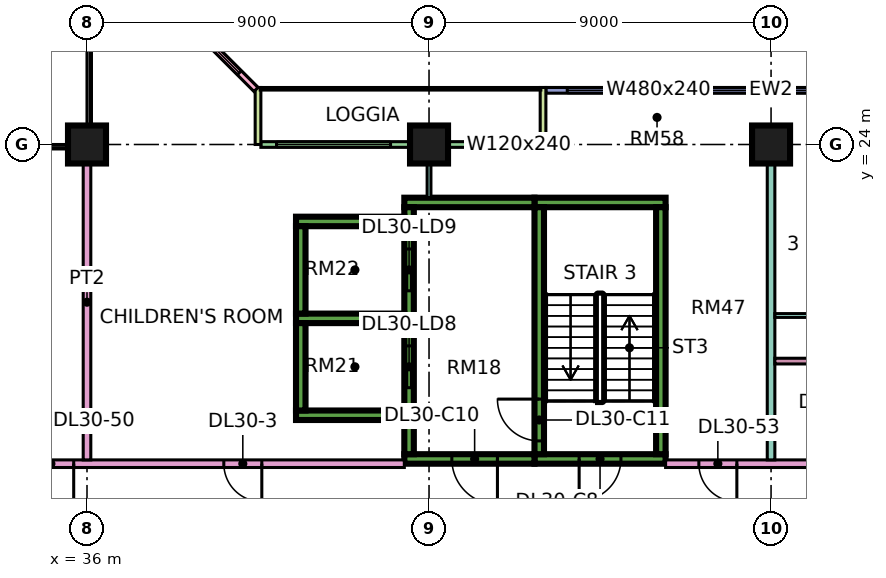
"""IFC4 building model, lengths in metres.
Left out: names, types, materials, properties, quantities, classifications, styles, units other than length and angle.
Written with IfcOpenShell. Run it as: python <this file> out.ifc"""

import sys

from ifc_helpers import new_model, si_unit, direction, frame, frame_2d, origin, origin_2d, place, context, subcontext, project, spatial, rectangle, extrude, element, fill, save


model = new_model("IFC4")
c1 = context("Model", 3, precision=1e-05, world=origin(), true_north=direction((0.0, 1.0)))
c2 = subcontext(c1, "Body", "Model", "MODEL_VIEW")
j1 = project(units=[si_unit("LENGTHUNIT", "METRE"), si_unit("PLANEANGLEUNIT", "RADIAN")], contexts=[c1])
p1 = place(None, origin())
s1 = spatial("IfcSite", under=j1, at=p1, CompositionType="ELEMENT")
p2 = place(p1, origin())
s2 = spatial("IfcBuilding", under=s1, at=p2, CompositionType="ELEMENT")
p3 = place(p2, frame((0.0, 0.0, 129.4)))
s3 = spatial("IfcBuildingStorey", under=s2, at=p3, CompositionType="ELEMENT", Elevation=129.4)
for number, where, z_axis, x_axis in (
    (1, (36.0, 24.0, 0.0), (0.0, 0.0, 1.0), (1.0, 0.0, 0.0)),
    (2, (45.0, 24.0, 0.0), (0.0, 0.0, 1.0), (1.0, 0.0, 0.0)),
    (3, (54.0, 24.0, 0.0), (0.0, 0.0, 1.0), (1.0, 0.0, 0.0)),
):
    element("IfcColumn", number, at=place(p3, frame(where, z_axis=z_axis, x_axis=x_axis)), inside=s3, PredefinedType="COLUMN", context=c2, shape_type="SweptSolid", body=[
        extrude(rectangle(XDim=1.0, YDim=1.0, at=origin_2d()), origin(), (0.0, 0.0, 1.0), 3.75),
    ])
p4 = place(p3, frame((47.775, 15.725, 0.0), z_axis=(0.0, 0.0, 1.0), x_axis=(1.0, 0.0, 0.0)))
e4 = element("IfcWall", 4, at=p4, inside=s3, PredefinedType="SHEAR", context=c2, shape_type="SweptSolid", body=[
    extrude(rectangle(XDim=3.45, YDim=0.25, at=frame_2d((1.725, 0.0))), origin(), (0.0, 0.0, 1.0), 3.75),
])
p5 = place(p4, frame((1.175, 0.0, 0.0)))
e5 = element("IfcOpeningElement", 5, at=p5, cuts=e4, PredefinedType="OPENING", context=c2, shape_type="SweptSolid", body=[
    extrude(rectangle(XDim=1.1, YDim=2.2, at=frame_2d((0.55, 1.1))), frame((0.0, 0.135, 0.0), z_axis=(0.0, -1.0, 0.0), x_axis=(1.0, 0.0, 0.0)), (0.0, 0.0, 1.0), 0.27),
])
p6 = place(p3, frame((47.775, 22.475, 0.0), z_axis=(0.0, 0.0, 1.0), x_axis=(1.0, 0.0, 0.0)))
e6 = element("IfcWall", 6, at=p6, inside=s3, PredefinedType="SHEAR", context=c2, shape_type="SweptSolid", body=[
    extrude(rectangle(XDim=3.45, YDim=0.25, at=frame_2d((1.725, 0.0))), origin(), (0.0, 0.0, 1.0), 3.75),
])
p7 = place(p3, frame((47.9, 15.85, 0.0), z_axis=(0.0, 0.0, 1.0), x_axis=(0.0, 1.0, 0.0)))
e7 = element("IfcWall", 7, at=p7, inside=s3, PredefinedType="SHEAR", context=c2, shape_type="SweptSolid", body=[
    extrude(rectangle(XDim=6.5, YDim=0.25, at=frame_2d((3.25, 0.0))), origin(), (0.0, 0.0, 1.0), 3.75),
])
p8 = place(p7, frame((0.35, 0.0, 0.0)))
e8 = element("IfcOpeningElement", 8, at=p8, cuts=e7, PredefinedType="OPENING", context=c2, shape_type="SweptSolid", body=[
    extrude(rectangle(XDim=1.1, YDim=2.2, at=frame_2d((0.55, 1.1))), frame((0.0, 0.135, 0.0), z_axis=(0.0, -1.0, 0.0), x_axis=(1.0, 0.0, 0.0)), (0.0, 0.0, 1.0), 0.27),
])
p9 = place(p3, frame((51.1, 15.85, 0.0), z_axis=(0.0, 0.0, 1.0), x_axis=(0.0, 1.0, 0.0)))
e9 = element("IfcWall", 9, at=p9, inside=s3, PredefinedType="SHEAR", context=c2, shape_type="SweptSolid", body=[
    extrude(rectangle(XDim=6.5, YDim=0.25, at=frame_2d((3.25, 0.0))), origin(), (0.0, 0.0, 1.0), 3.75),
])
p10 = place(p3, frame((44.35, 15.725, 0.0), z_axis=(0.0, 0.0, 1.0), x_axis=(1.0, 0.0, 0.0)))
e10 = element("IfcWall", 10, at=p10, inside=s3, PredefinedType="SHEAR", context=c2, shape_type="SweptSolid", body=[
    extrude(rectangle(XDim=3.425, YDim=0.25, at=frame_2d((1.712, 0.0))), origin(), (0.0, 0.0, 1.0), 3.75),
])
p11 = place(p10, frame((1.25, 0.0, 0.0)))
e11 = element("IfcOpeningElement", 11, at=p11, cuts=e10, PredefinedType="OPENING", context=c2, shape_type="SweptSolid", body=[
    extrude(rectangle(XDim=1.2, YDim=2.2, at=frame_2d((0.6, 1.1))), frame((0.0, 0.135, 0.0), z_axis=(0.0, -1.0, 0.0), x_axis=(1.0, 0.0, 0.0)), (0.0, 0.0, 1.0), 0.27),
])
p12 = place(p3, frame((44.35, 22.475, 0.0), z_axis=(0.0, 0.0, 1.0), x_axis=(1.0, 0.0, 0.0)))
e12 = element("IfcWall", 12, at=p12, inside=s3, PredefinedType="SHEAR", context=c2, shape_type="SweptSolid", body=[
    extrude(rectangle(XDim=3.425, YDim=0.25, at=frame_2d((1.712, 0.0))), origin(), (0.0, 0.0, 1.0), 3.75),
])
p13 = place(p3, frame((44.475, 15.85, 0.0), z_axis=(0.0, 0.0, 1.0), x_axis=(0.0, 1.0, 0.0)))
e13 = element("IfcWall", 13, at=p13, inside=s3, PredefinedType="SHEAR", context=c2, shape_type="SweptSolid", body=[
    extrude(rectangle(XDim=6.5, YDim=0.25, at=frame_2d((3.25, 0.0))), origin(), (0.0, 0.0, 1.0), 3.75),
])
p14 = place(p13, frame((1.75, 0.0, 0.0)))
e14 = element("IfcOpeningElement", 14, at=p14, cuts=e13, PredefinedType="OPENING", context=c2, shape_type="SweptSolid", body=[
    extrude(rectangle(XDim=1.1, YDim=2.2, at=frame_2d((0.55, 1.1))), frame((0.0, 0.135, 0.0), z_axis=(0.0, -1.0, 0.0), x_axis=(1.0, 0.0, 0.0)), (0.0, 0.0, 1.0), 0.27),
])
p15 = place(p13, frame((4.3, 0.0, 0.0)))
e15 = element("IfcOpeningElement", 15, at=p15, cuts=e13, PredefinedType="OPENING", context=c2, shape_type="SweptSolid", body=[
    extrude(rectangle(XDim=1.1, YDim=2.2, at=frame_2d((0.55, 1.1))), frame((0.0, 0.135, 0.0), z_axis=(0.0, -1.0, 0.0), x_axis=(1.0, 0.0, 0.0)), (0.0, 0.0, 1.0), 0.27),
])
for number, where, z_axis, x_axis in (
    (16, (41.5, 16.875, 0.0), (0.0, 0.0, 1.0), (1.0, 0.0, 0.0)),
    (17, (41.5, 19.425, 0.0), (0.0, 0.0, 1.0), (1.0, 0.0, 0.0)),
    (18, (41.5, 21.975, 0.0), (0.0, 0.0, 1.0), (1.0, 0.0, 0.0)),
):
    element("IfcWall", number, at=place(p3, frame(where, z_axis=z_axis, x_axis=x_axis)), inside=s3, PredefinedType="SHEAR", context=c2, shape_type="SweptSolid", body=[
        extrude(rectangle(XDim=2.85, YDim=0.25, at=frame_2d((1.425, 0.0))), origin(), (0.0, 0.0, 1.0), 3.75),
    ])
for number, where, z_axis, x_axis in (
    (19, (41.625, 17.0, 0.0), (0.0, 0.0, 1.0), (0.0, 1.0, 0.0)),
    (20, (41.625, 19.55, 0.0), (0.0, 0.0, 1.0), (0.0, 1.0, 0.0)),
):
    element("IfcWall", number, at=place(p3, frame(where, z_axis=z_axis, x_axis=x_axis)), inside=s3, PredefinedType="SHEAR", context=c2, shape_type="SweptSolid", body=[
        extrude(rectangle(XDim=2.3, YDim=0.25, at=frame_2d((1.15, 0.0))), origin(), (0.0, 0.0, 1.0), 3.75),
    ])
p16 = place(p3, frame((59.925, 25.425, 0.0), z_axis=(0.0, 0.0, 1.0), x_axis=(-1.0, 0.0, 0.0)))
e21 = element("IfcWall", 21, at=p16, inside=s3, PredefinedType="SOLIDWALL", context=c2, shape_type="SweptSolid", body=[
    extrude(rectangle(XDim=11.85, YDim=0.15, at=frame_2d((5.925, 0.0))), origin(), (0.0, 0.0, 1.0), 3.35),
])
p17 = place(p16, frame((0.562, 0.0, 0.45)))
e22 = element("IfcOpeningElement", 22, at=p17, cuts=e21, PredefinedType="OPENING", context=c2, shape_type="SweptSolid", body=[
    extrude(rectangle(XDim=1.8, YDim=2.4, at=frame_2d((0.9, 1.2))), frame((0.0, 0.085, 0.0), z_axis=(0.0, -1.0, 0.0), x_axis=(1.0, 0.0, 0.0)), (0.0, 0.0, 1.0), 0.17),
])
p18 = place(p16, frame((3.525, 0.0, 0.45)))
e23 = element("IfcOpeningElement", 23, at=p18, cuts=e21, PredefinedType="OPENING", context=c2, shape_type="SweptSolid", body=[
    extrude(rectangle(XDim=1.8, YDim=2.4, at=frame_2d((0.9, 1.2))), frame((0.0, 0.085, 0.0), z_axis=(0.0, -1.0, 0.0), x_axis=(1.0, 0.0, 0.0)), (0.0, 0.0, 1.0), 0.17),
])
p19 = place(p16, frame((6.488, 0.0, 0.45)))
e24 = element("IfcOpeningElement", 24, at=p19, cuts=e21, PredefinedType="OPENING", context=c2, shape_type="SweptSolid", body=[
    extrude(rectangle(XDim=4.8, YDim=2.4, at=frame_2d((2.4, 1.2))), frame((0.0, 0.085, 0.0), z_axis=(0.0, -1.0, 0.0), x_axis=(1.0, 0.0, 0.0)), (0.0, 0.0, 1.0), 0.17),
])
p20 = place(p3, frame((47.925, 24.0, 0.0), z_axis=(0.0, 0.0, 1.0), x_axis=(-1.0, 0.0, 0.0)))
e25 = element("IfcWall", 25, at=p20, inside=s3, PredefinedType="SOLIDWALL", context=c2, shape_type="SweptSolid", body=[
    extrude(rectangle(XDim=7.35, YDim=0.15, at=frame_2d((3.675, 0.0))), origin(), (0.0, 0.0, 1.0), 3.35),
])
p21 = place(p20, frame((0.562, 0.0, 0.45)))
e26 = element("IfcOpeningElement", 26, at=p21, cuts=e25, PredefinedType="OPENING", context=c2, shape_type="SweptSolid", body=[
    extrude(rectangle(XDim=1.2, YDim=2.4, at=frame_2d((0.6, 1.2))), frame((0.0, 0.085, 0.0), z_axis=(0.0, -1.0, 0.0), x_axis=(1.0, 0.0, 0.0)), (0.0, 0.0, 1.0), 0.17),
])
p22 = place(p20, frame((3.938, 0.0, 0.45)))
e27 = element("IfcOpeningElement", 27, at=p22, cuts=e25, PredefinedType="OPENING", context=c2, shape_type="SweptSolid", body=[
    extrude(rectangle(XDim=3.0, YDim=2.4, at=frame_2d((1.5, 1.2))), frame((0.0, 0.085, 0.0), z_axis=(0.0, -1.0, 0.0), x_axis=(1.0, 0.0, 0.0)), (0.0, 0.0, 1.0), 0.17),
])
for number, where, z_axis, x_axis in (
    (28, (48.0, 25.5, 0.0), (0.0, 0.0, 1.0), (0.0, -1.0, 0.0)),
    (29, (40.5, 25.5, 0.0), (0.0, 0.0, 1.0), (0.0, -1.0, 0.0)),
):
    element("IfcWall", number, at=place(p3, frame(where, z_axis=z_axis, x_axis=x_axis)), inside=s3, PredefinedType="SOLIDWALL", context=c2, shape_type="SweptSolid", body=[
        extrude(rectangle(XDim=1.5, YDim=0.15, at=frame_2d((0.75, 0.0))), origin(), (0.0, 0.0, 1.0), 3.35),
    ])
p23 = place(p3, frame((40.447, 25.447, 0.0), z_axis=(0.0, 0.0, 1.0), x_axis=(-0.707106781187, 0.707106781187, 0.0)))
e30 = element("IfcWall", 30, at=p23, inside=s3, PredefinedType="SOLIDWALL", context=c2, shape_type="SweptSolid", body=[
    extrude(rectangle(XDim=4.243, YDim=0.15, at=frame_2d((2.121, 0.0))), origin(), (0.0, 0.0, 1.0), 3.35),
])
p24 = place(p23, frame((0.621, 0.0, 0.45)))
e31 = element("IfcOpeningElement", 31, at=p24, cuts=e30, PredefinedType="OPENING", context=c2, shape_type="SweptSolid", body=[
    extrude(rectangle(XDim=3.0, YDim=2.4, at=frame_2d((1.5, 1.2))), frame((0.0, 0.085, 0.0), z_axis=(0.0, -1.0, 0.0), x_axis=(1.0, 0.0, 0.0)), (0.0, 0.0, 1.0), 0.17),
])
p25 = place(p3, frame((34.0, 15.6, 0.0), z_axis=(0.0, 0.0, 1.0), x_axis=(1.0, 0.0, 0.0)))
e32 = element("IfcWall", 32, at=p25, inside=s3, PredefinedType="PARTITIONING", context=c2, shape_type="SweptSolid", body=[
    extrude(rectangle(XDim=10.35, YDim=0.2, at=frame_2d((5.175, 0.0))), origin(), (0.0, 0.0, 1.0), 3.35),
])
p26 = place(p25, frame((5.6, 0.0, 0.0)))
e33 = element("IfcOpeningElement", 33, at=p26, cuts=e32, PredefinedType="OPENING", context=c2, shape_type="SweptSolid", body=[
    extrude(rectangle(XDim=1.0, YDim=2.1, at=frame_2d((0.5, 1.05))), frame((0.0, 0.11, 0.0), z_axis=(0.0, -1.0, 0.0), x_axis=(1.0, 0.0, 0.0)), (0.0, 0.0, 1.0), 0.22),
])
p27 = place(p25, frame((0.45, 0.0, 0.0)))
e34 = element("IfcOpeningElement", 34, at=p27, cuts=e32, PredefinedType="OPENING", context=c2, shape_type="SweptSolid", body=[
    extrude(rectangle(XDim=1.2, YDim=2.1, at=frame_2d((0.6, 1.05))), frame((0.0, 0.11, 0.0), z_axis=(0.0, -1.0, 0.0), x_axis=(1.0, 0.0, 0.0)), (0.0, 0.0, 1.0), 0.22),
])
p28 = place(p3, frame((36.0, 15.7, 0.0), z_axis=(0.0, 0.0, 1.0), x_axis=(0.0, 1.0, 0.0)))
e35 = element("IfcWall", 35, at=p28, inside=s3, PredefinedType="PARTITIONING", context=c2, shape_type="SweptSolid", body=[
    extrude(rectangle(XDim=8.3, YDim=0.2, at=frame_2d((4.15, 0.0))), origin(), (0.0, 0.0, 1.0), 3.35),
])
p29 = place(p3, frame((45.0, 22.6, 0.0), z_axis=(0.0, 0.0, 1.0), x_axis=(0.0, 1.0, 0.0)))
e36 = element("IfcWall", 36, at=p29, inside=s3, PredefinedType="PARTITIONING", context=c2, shape_type="SweptSolid", body=[
    extrude(rectangle(XDim=1.326, YDim=0.1, at=frame_2d((0.663, 0.0))), origin(), (0.0, 0.0, 1.0), 3.35),
])
p30 = place(p3, frame((51.225, 15.6, 0.0), z_axis=(0.0, 0.0, 1.0), x_axis=(1.0, 0.0, 0.0)))
e37 = element("IfcWall", 37, at=p30, inside=s3, PredefinedType="PARTITIONING", context=c2, shape_type="SweptSolid", body=[
    extrude(rectangle(XDim=20.701, YDim=0.2, at=frame_2d((10.351, 0.0))), origin(), (0.0, 0.0, 1.0), 3.35),
])
p31 = place(p30, frame((15.875, 0.0, 0.0)))
e38 = element("IfcOpeningElement", 38, at=p31, cuts=e37, PredefinedType="OPENING", context=c2, shape_type="SweptSolid", body=[
    extrude(rectangle(XDim=1.0, YDim=2.1, at=frame_2d((0.5, 1.05))), frame((0.0, 0.11, 0.0), z_axis=(0.0, -1.0, 0.0), x_axis=(1.0, 0.0, 0.0)), (0.0, 0.0, 1.0), 0.22),
])
p32 = place(p30, frame((0.875, 0.0, 0.0)))
e39 = element("IfcOpeningElement", 39, at=p32, cuts=e37, PredefinedType="OPENING", context=c2, shape_type="SweptSolid", body=[
    extrude(rectangle(XDim=1.0, YDim=2.1, at=frame_2d((0.5, 1.05))), frame((0.0, 0.11, 0.0), z_axis=(0.0, -1.0, 0.0), x_axis=(1.0, 0.0, 0.0)), (0.0, 0.0, 1.0), 0.22),
])
p33 = place(p3, frame((54.0, 15.7, 0.0), z_axis=(0.0, 0.0, 1.0), x_axis=(0.0, 1.0, 0.0)))
e40 = element("IfcWall", 40, at=p33, inside=s3, PredefinedType="PARTITIONING", context=c2, shape_type="SweptSolid", body=[
    extrude(rectangle(XDim=8.3, YDim=0.2, at=frame_2d((4.15, 0.0))), origin(), (0.0, 0.0, 1.0), 3.35),
])
p34 = place(p3, frame((54.1, 18.3, 0.0), z_axis=(0.0, 0.0, 1.0), x_axis=(1.0, 0.0, 0.0)))
e41 = element("IfcWall", 41, at=p34, inside=s3, PredefinedType="PARTITIONING", context=c2, shape_type="SweptSolid", body=[
    extrude(rectangle(XDim=11.975, YDim=0.15, at=frame_2d((5.987, 0.0))), origin(), (0.0, 0.0, 1.0), 3.35),
])
p35 = place(p34, frame((5.45, 0.0, 0.0)))
e42 = element("IfcOpeningElement", 42, at=p35, cuts=e41, PredefinedType="OPENING", context=c2, shape_type="SweptSolid", body=[
    extrude(rectangle(XDim=0.9, YDim=2.1, at=frame_2d((0.45, 1.05))), frame((0.0, 0.085, 0.0), z_axis=(0.0, -1.0, 0.0), x_axis=(1.0, 0.0, 0.0)), (0.0, 0.0, 1.0), 0.17),
])
p36 = place(p34, frame((1.25, 0.0, 0.0)))
e43 = element("IfcOpeningElement", 43, at=p36, cuts=e41, PredefinedType="OPENING", context=c2, shape_type="SweptSolid", body=[
    extrude(rectangle(XDim=0.9, YDim=2.1, at=frame_2d((0.45, 1.05))), frame((0.0, 0.085, 0.0), z_axis=(0.0, -1.0, 0.0), x_axis=(1.0, 0.0, 0.0)), (0.0, 0.0, 1.0), 0.17),
])
p37 = place(p3, frame((54.1, 19.5, 0.0), z_axis=(0.0, 0.0, 1.0), x_axis=(1.0, 0.0, 0.0)))
e44 = element("IfcWall", 44, at=p37, inside=s3, PredefinedType="PARTITIONING", context=c2, shape_type="SweptSolid", body=[
    extrude(rectangle(XDim=2.85, YDim=0.1, at=frame_2d((1.425, 0.0))), origin(), (0.0, 0.0, 1.0), 3.35),
])
p38 = place(p37, frame((0.95, 0.0, 0.0)))
e45 = element("IfcOpeningElement", 45, at=p38, cuts=e44, PredefinedType="OPENING", context=c2, shape_type="SweptSolid", body=[
    extrude(rectangle(XDim=0.9, YDim=2.1, at=frame_2d((0.45, 1.05))), frame((0.0, 0.06, 0.0), z_axis=(0.0, -1.0, 0.0), x_axis=(1.0, 0.0, 0.0)), (0.0, 0.0, 1.0), 0.12),
])
p39 = place(p18, origin())
e46 = element("IfcWindow", 46, at=p39, inside=s3, PartitioningType="SINGLE_PANEL", PredefinedType="WINDOW", context=c2, shape_type="SweptSolid", body=[
    extrude(rectangle(XDim=1.8, YDim=2.4, at=frame_2d((0.9, 1.2))), frame((0.0, 0.03, 0.0), z_axis=(0.0, -1.0, 0.0), x_axis=(1.0, 0.0, 0.0)), (0.0, 0.0, 1.0), 0.06),
])
fill(e23, e46)
p40 = place(p19, origin())
e47 = element("IfcWindow", 47, at=p40, inside=s3, PartitioningType="SINGLE_PANEL", PredefinedType="WINDOW", context=c2, shape_type="SweptSolid", body=[
    extrude(rectangle(XDim=4.8, YDim=2.4, at=frame_2d((2.4, 1.2))), frame((0.0, 0.03, 0.0), z_axis=(0.0, -1.0, 0.0), x_axis=(1.0, 0.0, 0.0)), (0.0, 0.0, 1.0), 0.06),
])
fill(e24, e47)
p41 = place(p21, origin())
e48 = element("IfcWindow", 48, at=p41, inside=s3, PartitioningType="SINGLE_PANEL", PredefinedType="WINDOW", context=c2, shape_type="SweptSolid", body=[
    extrude(rectangle(XDim=1.2, YDim=2.4, at=frame_2d((0.6, 1.2))), frame((0.0, 0.03, 0.0), z_axis=(0.0, -1.0, 0.0), x_axis=(1.0, 0.0, 0.0)), (0.0, 0.0, 1.0), 0.06),
])
fill(e26, e48)
p42 = place(p22, origin())
e49 = element("IfcWindow", 49, at=p42, inside=s3, PartitioningType="SINGLE_PANEL", PredefinedType="WINDOW", context=c2, shape_type="SweptSolid", body=[
    extrude(rectangle(XDim=3.0, YDim=2.4, at=frame_2d((1.5, 1.2))), frame((0.0, 0.03, 0.0), z_axis=(0.0, -1.0, 0.0), x_axis=(1.0, 0.0, 0.0)), (0.0, 0.0, 1.0), 0.06),
])
fill(e27, e49)
p43 = place(p24, origin())
e50 = element("IfcWindow", 50, at=p43, inside=s3, PartitioningType="SINGLE_PANEL", PredefinedType="WINDOW", context=c2, shape_type="SweptSolid", body=[
    extrude(rectangle(XDim=3.0, YDim=2.4, at=frame_2d((1.5, 1.2))), frame((0.0, 0.03, 0.0), z_axis=(0.0, -1.0, 0.0), x_axis=(1.0, 0.0, 0.0)), (0.0, 0.0, 1.0), 0.06),
])
fill(e31, e50)
p44 = place(p5, frame((1.1, 0.0, 0.0), z_axis=(0.0, 0.0, 1.0), x_axis=(-1.0, 0.0, 0.0)))
e51 = element("IfcDoor", 51, at=p44, inside=s3, OperationType="SINGLE_SWING_LEFT", PredefinedType="DOOR", context=c2, shape_type="SweptSolid", body=[
    extrude(rectangle(XDim=1.1, YDim=2.2, at=frame_2d((0.55, 1.1))), frame((0.0, 0.025, 0.0), z_axis=(0.0, -1.0, 0.0), x_axis=(1.0, 0.0, 0.0)), (0.0, 0.0, 1.0), 0.05),
])
fill(e5, e51)
p45 = place(p11, origin())
e52 = element("IfcDoor", 52, at=p45, inside=s3, OperationType="SINGLE_SWING_RIGHT", PredefinedType="DOOR", context=c2, shape_type="SweptSolid", body=[
    extrude(rectangle(XDim=1.2, YDim=2.2, at=frame_2d((0.6, 1.1))), frame((0.0, 0.025, 0.0), z_axis=(0.0, -1.0, 0.0), x_axis=(1.0, 0.0, 0.0)), (0.0, 0.0, 1.0), 0.05),
])
fill(e11, e52)
p46 = place(p8, frame((1.1, 0.0, 0.0), z_axis=(0.0, 0.0, 1.0), x_axis=(-1.0, 0.0, 0.0)))
e53 = element("IfcDoor", 53, at=p46, inside=s3, OperationType="SINGLE_SWING_RIGHT", PredefinedType="DOOR", context=c2, shape_type="SweptSolid", body=[
    extrude(rectangle(XDim=1.1, YDim=2.2, at=frame_2d((0.55, 1.1))), frame((0.0, 0.025, 0.0), z_axis=(0.0, -1.0, 0.0), x_axis=(1.0, 0.0, 0.0)), (0.0, 0.0, 1.0), 0.05),
])
fill(e8, e53)
p47 = place(p14, origin())
e54 = element("IfcDoor", 54, at=p47, inside=s3, OperationType="DOUBLE_DOOR_SLIDING", PredefinedType="DOOR", context=c2, shape_type="SweptSolid", body=[
    extrude(rectangle(XDim=1.1, YDim=2.2, at=frame_2d((0.55, 1.1))), frame((0.0, 0.025, 0.0), z_axis=(0.0, -1.0, 0.0), x_axis=(1.0, 0.0, 0.0)), (0.0, 0.0, 1.0), 0.05),
])
fill(e14, e54)
p48 = place(p15, origin())
e55 = element("IfcDoor", 55, at=p48, inside=s3, OperationType="DOUBLE_DOOR_SLIDING", PredefinedType="DOOR", context=c2, shape_type="SweptSolid", body=[
    extrude(rectangle(XDim=1.1, YDim=2.2, at=frame_2d((0.55, 1.1))), frame((0.0, 0.025, 0.0), z_axis=(0.0, -1.0, 0.0), x_axis=(1.0, 0.0, 0.0)), (0.0, 0.0, 1.0), 0.05),
])
fill(e15, e55)
p49 = place(p26, origin())
e56 = element("IfcDoor", 56, at=p49, inside=s3, OperationType="SINGLE_SWING_RIGHT", PredefinedType="DOOR", context=c2, shape_type="SweptSolid", body=[
    extrude(rectangle(XDim=1.0, YDim=2.1, at=frame_2d((0.5, 1.05))), frame((0.0, 0.025, 0.0), z_axis=(0.0, -1.0, 0.0), x_axis=(1.0, 0.0, 0.0)), (0.0, 0.0, 1.0), 0.05),
])
fill(e33, e56)
p50 = place(p27, origin())
e57 = element("IfcDoor", 57, at=p50, inside=s3, OperationType="SINGLE_SWING_RIGHT", PredefinedType="DOOR", context=c2, shape_type="SweptSolid", body=[
    extrude(rectangle(XDim=1.2, YDim=2.1, at=frame_2d((0.6, 1.05))), frame((0.0, 0.025, 0.0), z_axis=(0.0, -1.0, 0.0), x_axis=(1.0, 0.0, 0.0)), (0.0, 0.0, 1.0), 0.05),
])
fill(e34, e57)
p51 = place(p32, origin())
e58 = element("IfcDoor", 58, at=p51, inside=s3, OperationType="SINGLE_SWING_RIGHT", PredefinedType="DOOR", context=c2, shape_type="SweptSolid", body=[
    extrude(rectangle(XDim=1.0, YDim=2.1, at=frame_2d((0.5, 1.05))), frame((0.0, 0.025, 0.0), z_axis=(0.0, -1.0, 0.0), x_axis=(1.0, 0.0, 0.0)), (0.0, 0.0, 1.0), 0.05),
])
fill(e39, e58)
save(model, sys.argv[1])
